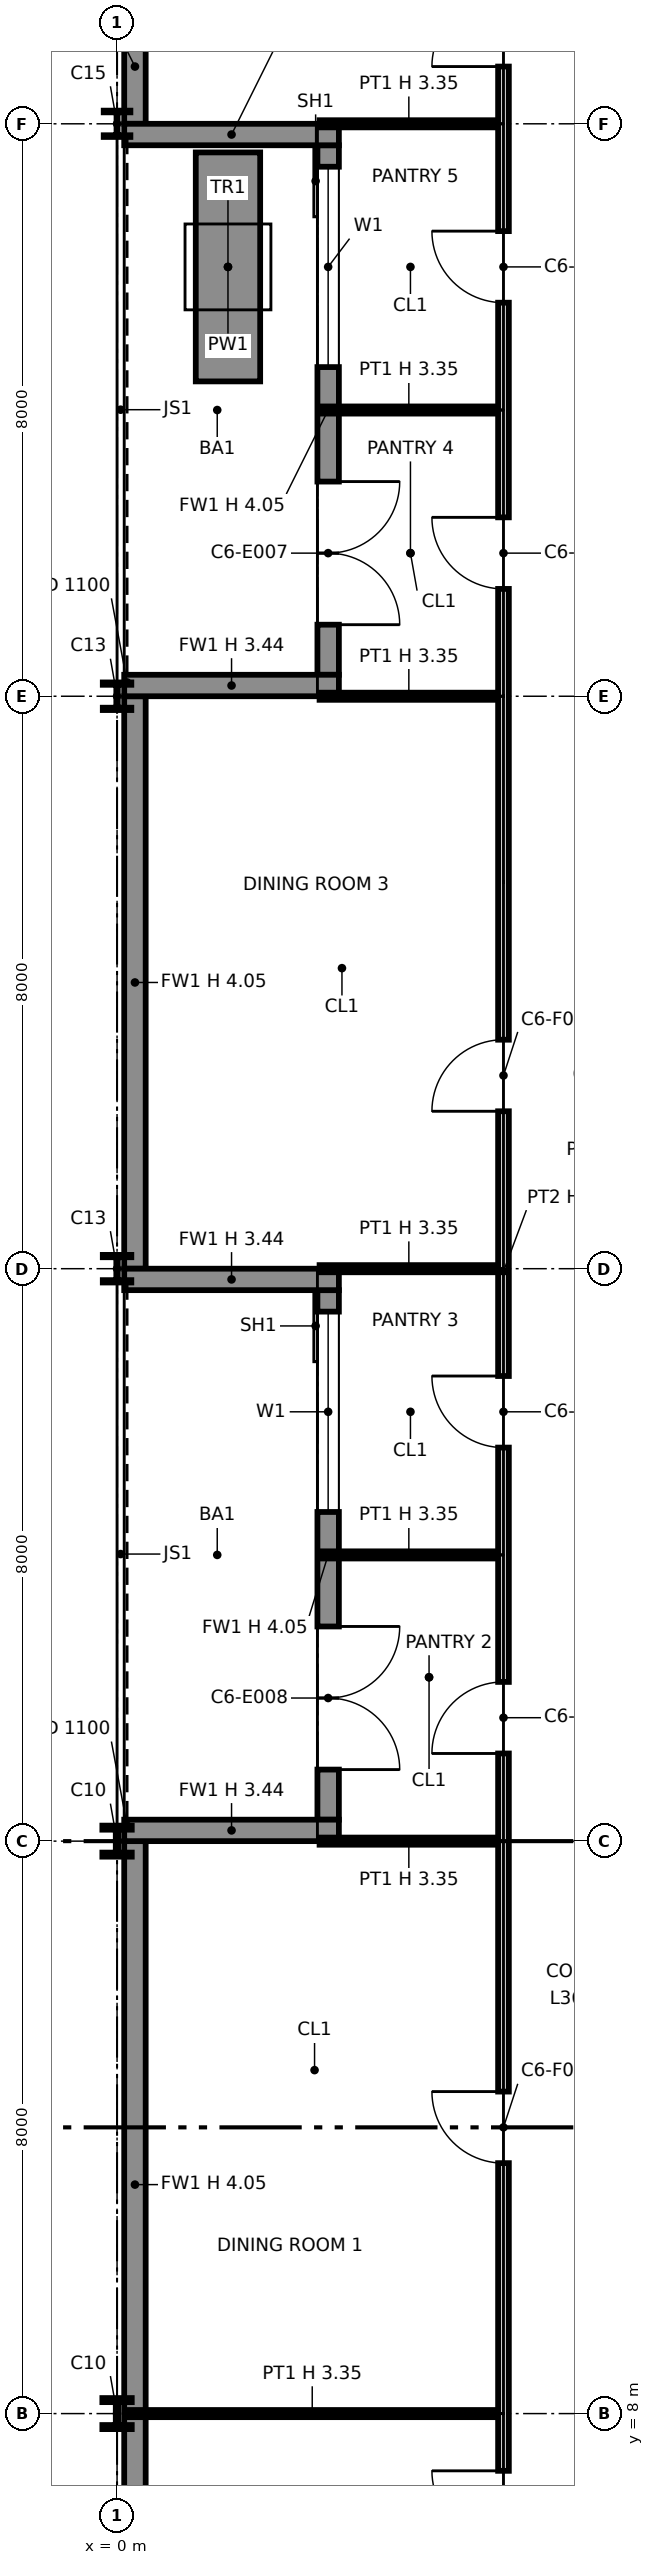
"""IFC4 building model, lengths in metres.
Left out: names, types, materials, properties, quantities, classifications, styles, units other than length and angle.
Written with IfcOpenShell. Run it as: python <this file> out.ifc"""

import sys

from ifc_helpers import new_model, si_unit, direction, frame, frame_2d, origin, origin_2d, place, context, subcontext, project, spatial, polyline, rectangle, i_section, outline, extrude, element, fill, save


model = new_model("IFC4")
c1 = context("Model", 3, precision=1e-05, world=origin(), true_north=direction((0.0, 1.0)))
c2 = subcontext(c1, "Body", "Model", "MODEL_VIEW")
j1 = project(units=[si_unit("LENGTHUNIT", "METRE"), si_unit("PLANEANGLEUNIT", "RADIAN")], contexts=[c1])
p1 = place(None, origin())
s1 = spatial("IfcSite", under=j1, at=p1, CompositionType="ELEMENT")
p2 = place(p1, origin())
s2 = spatial("IfcBuilding", under=s1, at=p2, CompositionType="ELEMENT")
p3 = place(p2, frame((0.0, 0.0, 174.6)))
s3 = spatial("IfcBuildingStorey", under=s2, at=p3, CompositionType="ELEMENT", Elevation=174.6)
for number, where, z_axis, x_axis in (
    (1, (0.0, 8.0, 0.0), (0.0, 0.0, 1.0), (1.0, 0.0, 0.0)),
    (2, (0.0, 16.0, 0.0), (0.0, 0.0, 1.0), (1.0, 0.0, 0.0)),
):
    element("IfcColumn", number, at=place(p3, frame(where, z_axis=z_axis, x_axis=x_axis)), inside=s3, PredefinedType="COLUMN", context=c2, shape_type="SweptSolid", body=[
        extrude(i_section(OverallWidth=0.411, OverallDepth=0.434, WebThickness=0.036, FlangeThickness=0.057, at=origin_2d()), origin(), (0.0, 0.0, 1.0), 4.05),
    ])
for number, where, z_axis, x_axis in (
    (3, (0.0, 24.0, 0.0), (0.0, 0.0, 1.0), (1.0, 0.0, 0.0)),
    (4, (0.0, 32.0, 0.0), (0.0, 0.0, 1.0), (1.0, 0.0, 0.0)),
):
    element("IfcColumn", number, at=place(p3, frame(where, z_axis=z_axis, x_axis=x_axis)), inside=s3, PredefinedType="COLUMN", context=c2, shape_type="SweptSolid", body=[
        extrude(i_section(OverallWidth=0.399, OverallDepth=0.386, WebThickness=0.021, FlangeThickness=0.033, at=origin_2d()), origin(), (0.0, 0.0, 1.0), 4.05),
    ])
p4 = place(p3, frame((0.0, 40.0, 0.0), z_axis=(0.0, 0.0, 1.0), x_axis=(1.0, 0.0, 0.0)))
e5 = element("IfcColumn", 5, at=p4, inside=s3, PredefinedType="COLUMN", context=c2, shape_type="SweptSolid", body=[
    extrude(i_section(OverallWidth=0.373, OverallDepth=0.368, WebThickness=0.015, FlangeThickness=0.024, at=origin_2d()), origin(), (0.0, 0.0, 1.0), 4.05),
])
p5 = place(p3, frame((0.25, 41.6, 0.0), z_axis=(0.0, 0.0, 1.0), x_axis=(0.0, -1.0, 0.0)))
e6 = element("IfcWall", 6, at=p5, inside=s3, PredefinedType="SOLIDWALL", context=c2, shape_type="SweptSolid", body=[
    extrude(rectangle(XDim=1.6, YDim=0.3, at=frame_2d((0.8, 0.0))), origin(), (0.0, 0.0, 1.0), 4.05),
])
p6 = place(p3, frame((2.95, 39.7, 0.0), z_axis=(0.0, 0.0, 1.0), x_axis=(0.0, -1.0, 0.0)))
e7 = element("IfcWall", 7, at=p6, inside=s3, PredefinedType="SOLIDWALL", context=c2, shape_type="SweptSolid", body=[
    extrude(rectangle(XDim=7.4, YDim=0.3, at=frame_2d((3.7, 0.0))), origin(), (0.0, 0.0, 1.0), 4.05),
])
p7 = place(p6, frame((0.3, 0.0, 0.9)))
e8 = element("IfcOpeningElement", 8, at=p7, cuts=e7, PredefinedType="OPENING", context=c2, shape_type="SweptSolid", body=[
    extrude(rectangle(XDim=2.8, YDim=2.2, at=frame_2d((1.4, 1.1))), frame((0.0, 0.16, 0.0), z_axis=(0.0, -1.0, 0.0), x_axis=(1.0, 0.0, 0.0)), (0.0, 0.0, 1.0), 0.32),
])
p8 = place(p6, frame((4.7, 0.0, 0.0)))
e9 = element("IfcOpeningElement", 9, at=p8, cuts=e7, PredefinedType="OPENING", context=c2, shape_type="SweptSolid", body=[
    extrude(rectangle(XDim=2.0, YDim=2.4, at=frame_2d((1.0, 1.2))), frame((0.0, 0.16, 0.0), z_axis=(0.0, -1.0, 0.0), x_axis=(1.0, 0.0, 0.0)), (0.0, 0.0, 1.0), 0.32),
])
p9 = place(p3, frame((0.1, 39.85, 0.0), z_axis=(0.0, 0.0, 1.0), x_axis=(1.0, 0.0, 0.0)))
e10 = element("IfcWall", 10, at=p9, inside=s3, PredefinedType="SOLIDWALL", context=c2, shape_type="SweptSolid", body=[
    extrude(rectangle(XDim=3.0, YDim=0.3, at=frame_2d((1.5, 0.0))), origin(), (0.0, 0.0, 1.0), 3.353),
])
p10 = place(p3, frame((0.1, 32.15, 0.0), z_axis=(0.0, 0.0, 1.0), x_axis=(1.0, 0.0, 0.0)))
e11 = element("IfcWall", 11, at=p10, inside=s3, PredefinedType="SOLIDWALL", context=c2, shape_type="SweptSolid", body=[
    extrude(rectangle(XDim=3.0, YDim=0.3, at=frame_2d((1.5, 0.0))), origin(), (0.0, 0.0, 1.0), 3.437),
])
p11 = place(p3, frame((0.25, 32.0, 0.0), z_axis=(0.0, 0.0, 1.0), x_axis=(0.0, -1.0, 0.0)))
e12 = element("IfcWall", 12, at=p11, inside=s3, PredefinedType="SOLIDWALL", context=c2, shape_type="SweptSolid", body=[
    extrude(rectangle(XDim=8.0, YDim=0.3, at=frame_2d((4.0, 0.0))), origin(), (0.0, 0.0, 1.0), 4.05),
])
p12 = place(p3, frame((2.95, 23.7, 0.0), z_axis=(0.0, 0.0, 1.0), x_axis=(0.0, -1.0, 0.0)))
e13 = element("IfcWall", 13, at=p12, inside=s3, PredefinedType="SOLIDWALL", context=c2, shape_type="SweptSolid", body=[
    extrude(rectangle(XDim=7.4, YDim=0.3, at=frame_2d((3.7, 0.0))), origin(), (0.0, 0.0, 1.0), 4.05),
])
p13 = place(p12, frame((0.3, 0.0, 0.9)))
e14 = element("IfcOpeningElement", 14, at=p13, cuts=e13, PredefinedType="OPENING", context=c2, shape_type="SweptSolid", body=[
    extrude(rectangle(XDim=2.8, YDim=2.2, at=frame_2d((1.4, 1.1))), frame((0.0, 0.16, 0.0), z_axis=(0.0, -1.0, 0.0), x_axis=(1.0, 0.0, 0.0)), (0.0, 0.0, 1.0), 0.32),
])
p14 = place(p12, frame((4.7, 0.0, 0.0)))
e15 = element("IfcOpeningElement", 15, at=p14, cuts=e13, PredefinedType="OPENING", context=c2, shape_type="SweptSolid", body=[
    extrude(rectangle(XDim=2.0, YDim=2.4, at=frame_2d((1.0, 1.2))), frame((0.0, 0.16, 0.0), z_axis=(0.0, -1.0, 0.0), x_axis=(1.0, 0.0, 0.0)), (0.0, 0.0, 1.0), 0.32),
])
for number, where, z_axis, x_axis in (
    (16, (0.1, 23.85, 0.0), (0.0, 0.0, 1.0), (1.0, 0.0, 0.0)),
    (17, (0.1, 16.15, 0.0), (0.0, 0.0, 1.0), (1.0, 0.0, 0.0)),
):
    element("IfcWall", number, at=place(p3, frame(where, z_axis=z_axis, x_axis=x_axis)), inside=s3, PredefinedType="SOLIDWALL", context=c2, shape_type="SweptSolid", body=[
        extrude(rectangle(XDim=3.0, YDim=0.3, at=frame_2d((1.5, 0.0))), origin(), (0.0, 0.0, 1.0), 3.437),
    ])
p15 = place(p3, frame((0.25, 16.0, 0.0), z_axis=(0.0, 0.0, 1.0), x_axis=(0.0, -1.0, 0.0)))
e18 = element("IfcWall", 18, at=p15, inside=s3, PredefinedType="SOLIDWALL", context=c2, shape_type="SweptSolid", body=[
    extrude(rectangle(XDim=9.6, YDim=0.3, at=frame_2d((4.8, 0.0))), origin(), (0.0, 0.0, 1.0), 4.05),
])
p16 = place(p3, frame((1.55, 39.6, 0.0), z_axis=(0.0, 0.0, 1.0), x_axis=(0.0, -1.0, 0.0)))
e19 = element("IfcWall", 19, at=p16, inside=s3, PredefinedType="SOLIDWALL", context=c2, shape_type="SweptSolid", body=[
    extrude(rectangle(XDim=3.2, YDim=0.9, at=frame_2d((1.6, 0.0))), origin(), (0.0, 0.0, 1.0), 0.6),
])
p17 = place(p3, frame((5.4, 5.4, 0.0), z_axis=(0.0, 0.0, 1.0), x_axis=(0.0, 1.0, 0.0)))
e20 = element("IfcWall", 20, at=p17, inside=s3, PredefinedType="PARTITIONING", context=c2, shape_type="SweptSolid", body=[
    extrude(outline(polyline([(0.0, 0.0), (37.125, 0.0), (37.125, 4.05), (34.9, 4.05), (34.898, 3.354), (34.302, 3.354), (34.3, 4.05), (30.9, 4.05), (30.898, 3.354), (30.302, 3.354), (30.3, 4.05), (26.9, 4.05), (26.898, 3.354), (26.302, 3.354), (26.3, 4.05), (22.9, 4.05), (22.898, 3.354), (22.302, 3.354), (22.3, 4.05), (18.9, 4.05), (18.898, 3.354), (18.302, 3.354), (18.3, 4.05), (14.9, 4.05), (14.898, 3.354), (14.302, 3.354), (14.3, 4.05), (10.9, 4.05), (10.898, 3.354), (10.302, 3.354), (10.3, 4.05), (6.9, 4.05), (6.898, 3.354), (6.302, 3.354), (6.3, 4.05), (2.9, 4.05), (2.898, 3.354), (2.302, 3.354), (2.3, 4.05), (0.0, 4.05), (0.0, 0.0)])), frame((0.0, 0.075, 0.0), z_axis=(0.0, -1.0, 0.0), x_axis=(1.0, 0.0, 0.0)), (0.0, 0.0, 1.0), 0.15),
])
p18 = place(p17, frame((0.8, 0.0, 0.0)))
e21 = element("IfcOpeningElement", 21, at=p18, cuts=e20, PredefinedType="OPENING", context=c2, shape_type="SweptSolid", body=[
    extrude(rectangle(XDim=1.0, YDim=2.1, at=frame_2d((0.5, 1.05))), frame((0.0, 0.085, 0.0), z_axis=(0.0, -1.0, 0.0), x_axis=(1.0, 0.0, 0.0)), (0.0, 0.0, 1.0), 0.17),
])
p19 = place(p17, frame((6.1, 0.0, 0.0)))
e22 = element("IfcOpeningElement", 22, at=p19, cuts=e20, PredefinedType="OPENING", context=c2, shape_type="SweptSolid", body=[
    extrude(rectangle(XDim=1.0, YDim=2.1, at=frame_2d((0.5, 1.05))), frame((0.0, 0.085, 0.0), z_axis=(0.0, -1.0, 0.0), x_axis=(1.0, 0.0, 0.0)), (0.0, 0.0, 1.0), 0.17),
])
p20 = place(p17, frame((11.825, 0.0, 0.0)))
e23 = element("IfcOpeningElement", 23, at=p20, cuts=e20, PredefinedType="OPENING", context=c2, shape_type="SweptSolid", body=[
    extrude(rectangle(XDim=1.0, YDim=2.1, at=frame_2d((0.5, 1.05))), frame((0.0, 0.085, 0.0), z_axis=(0.0, -1.0, 0.0), x_axis=(1.0, 0.0, 0.0)), (0.0, 0.0, 1.0), 0.17),
])
p21 = place(p17, frame((16.1, 0.0, 0.0)))
e24 = element("IfcOpeningElement", 24, at=p21, cuts=e20, PredefinedType="OPENING", context=c2, shape_type="SweptSolid", body=[
    extrude(rectangle(XDim=1.0, YDim=2.1, at=frame_2d((0.5, 1.05))), frame((0.0, 0.085, 0.0), z_axis=(0.0, -1.0, 0.0), x_axis=(1.0, 0.0, 0.0)), (0.0, 0.0, 1.0), 0.17),
])
p22 = place(p17, frame((20.8, 0.0, 0.0)))
e25 = element("IfcOpeningElement", 25, at=p22, cuts=e20, PredefinedType="OPENING", context=c2, shape_type="SweptSolid", body=[
    extrude(rectangle(XDim=1.0, YDim=2.1, at=frame_2d((0.5, 1.05))), frame((0.0, 0.085, 0.0), z_axis=(0.0, -1.0, 0.0), x_axis=(1.0, 0.0, 0.0)), (0.0, 0.0, 1.0), 0.17),
])
p23 = place(p17, frame((28.1, 0.0, 0.0)))
e26 = element("IfcOpeningElement", 26, at=p23, cuts=e20, PredefinedType="OPENING", context=c2, shape_type="SweptSolid", body=[
    extrude(rectangle(XDim=1.0, YDim=2.1, at=frame_2d((0.5, 1.05))), frame((0.0, 0.085, 0.0), z_axis=(0.0, -1.0, 0.0), x_axis=(1.0, 0.0, 0.0)), (0.0, 0.0, 1.0), 0.17),
])
p24 = place(p17, frame((32.1, 0.0, 0.0)))
e27 = element("IfcOpeningElement", 27, at=p24, cuts=e20, PredefinedType="OPENING", context=c2, shape_type="SweptSolid", body=[
    extrude(rectangle(XDim=1.0, YDim=2.1, at=frame_2d((0.5, 1.05))), frame((0.0, 0.085, 0.0), z_axis=(0.0, -1.0, 0.0), x_axis=(1.0, 0.0, 0.0)), (0.0, 0.0, 1.0), 0.17),
])
p25 = place(p17, frame((35.4, 0.0, 0.0)))
e28 = element("IfcOpeningElement", 28, at=p25, cuts=e20, PredefinedType="OPENING", context=c2, shape_type="SweptSolid", body=[
    extrude(rectangle(XDim=1.0, YDim=2.1, at=frame_2d((0.5, 1.05))), frame((0.0, 0.085, 0.0), z_axis=(0.0, -1.0, 0.0), x_axis=(1.0, 0.0, 0.0)), (0.0, 0.0, 1.0), 0.17),
])
p26 = place(p3, frame((0.13, 8.0, 0.0), z_axis=(0.0, 0.0, 1.0), x_axis=(1.0, 0.0, 0.0)))
e29 = element("IfcWall", 29, at=p26, inside=s3, PredefinedType="PARTITIONING", context=c2, shape_type="SweptSolid", body=[
    extrude(rectangle(XDim=5.195, YDim=0.1, at=frame_2d((2.598, 0.0))), origin(), (0.0, 0.0, 1.0), 3.354),
])
for number, where, z_axis, x_axis in (
    (30, (2.83, 16.0, 0.0), (0.0, 0.0, 1.0), (1.0, 0.0, 0.0)),
    (31, (2.83, 20.0, 0.0), (0.0, 0.0, 1.0), (1.0, 0.0, 0.0)),
    (32, (2.83, 24.0, 0.0), (0.0, 0.0, 1.0), (1.0, 0.0, 0.0)),
    (33, (2.83, 32.0, 0.0), (0.0, 0.0, 1.0), (1.0, 0.0, 0.0)),
    (34, (2.83, 36.0, 0.0), (0.0, 0.0, 1.0), (1.0, 0.0, 0.0)),
    (35, (2.83, 40.0, 0.0), (0.0, 0.0, 1.0), (1.0, 0.0, 0.0)),
):
    element("IfcWall", number, at=place(p3, frame(where, z_axis=z_axis, x_axis=x_axis)), inside=s3, PredefinedType="PARTITIONING", context=c2, shape_type="SweptSolid", body=[
        extrude(rectangle(XDim=2.495, YDim=0.1, at=frame_2d((1.248, 0.0))), origin(), (0.0, 0.0, 1.0), 3.354),
    ])
p27 = place(p7, origin())
e36 = element("IfcWindow", 36, at=p27, inside=s3, PartitioningType="SINGLE_PANEL", PredefinedType="WINDOW", context=c2, shape_type="SweptSolid", body=[
    extrude(rectangle(XDim=2.8, YDim=2.2, at=frame_2d((1.4, 1.1))), frame((0.0, 0.03, 0.0), z_axis=(0.0, -1.0, 0.0), x_axis=(1.0, 0.0, 0.0)), (0.0, 0.0, 1.0), 0.06),
])
fill(e8, e36)
p28 = place(p8, origin())
e37 = element("IfcDoor", 37, at=p28, inside=s3, OperationType="DOUBLE_DOOR_SINGLE_SWING", PredefinedType="DOOR", context=c2, shape_type="SweptSolid", body=[
    extrude(rectangle(XDim=2.0, YDim=2.4, at=frame_2d((1.0, 1.2))), frame((0.0, 0.025, 0.0), z_axis=(0.0, -1.0, 0.0), x_axis=(1.0, 0.0, 0.0)), (0.0, 0.0, 1.0), 0.05),
])
fill(e9, e37)
p29 = place(p13, origin())
e38 = element("IfcWindow", 38, at=p29, inside=s3, PartitioningType="SINGLE_PANEL", PredefinedType="WINDOW", context=c2, shape_type="SweptSolid", body=[
    extrude(rectangle(XDim=2.8, YDim=2.2, at=frame_2d((1.4, 1.1))), frame((0.0, 0.03, 0.0), z_axis=(0.0, -1.0, 0.0), x_axis=(1.0, 0.0, 0.0)), (0.0, 0.0, 1.0), 0.06),
])
fill(e14, e38)
p30 = place(p14, origin())
e39 = element("IfcDoor", 39, at=p30, inside=s3, OperationType="DOUBLE_DOOR_SINGLE_SWING", PredefinedType="DOOR", context=c2, shape_type="SweptSolid", body=[
    extrude(rectangle(XDim=2.0, YDim=2.4, at=frame_2d((1.0, 1.2))), frame((0.0, 0.025, 0.0), z_axis=(0.0, -1.0, 0.0), x_axis=(1.0, 0.0, 0.0)), (0.0, 0.0, 1.0), 0.05),
])
fill(e15, e39)
p31 = place(p18, origin())
e40 = element("IfcDoor", 40, at=p31, inside=s3, OperationType="SINGLE_SWING_RIGHT", PredefinedType="DOOR", context=c2, shape_type="SweptSolid", body=[
    extrude(rectangle(XDim=1.0, YDim=2.1, at=frame_2d((0.5, 1.05))), frame((0.0, 0.025, 0.0), z_axis=(0.0, -1.0, 0.0), x_axis=(1.0, 0.0, 0.0)), (0.0, 0.0, 1.0), 0.05),
])
fill(e21, e40)
p32 = place(p19, origin())
e41 = element("IfcDoor", 41, at=p32, inside=s3, OperationType="SINGLE_SWING_RIGHT", PredefinedType="DOOR", context=c2, shape_type="SweptSolid", body=[
    extrude(rectangle(XDim=1.0, YDim=2.1, at=frame_2d((0.5, 1.05))), frame((0.0, 0.025, 0.0), z_axis=(0.0, -1.0, 0.0), x_axis=(1.0, 0.0, 0.0)), (0.0, 0.0, 1.0), 0.05),
])
fill(e22, e41)
p33 = place(p20, origin())
e42 = element("IfcDoor", 42, at=p33, inside=s3, OperationType="SINGLE_SWING_LEFT", PredefinedType="DOOR", context=c2, shape_type="SweptSolid", body=[
    extrude(rectangle(XDim=1.0, YDim=2.1, at=frame_2d((0.5, 1.05))), frame((0.0, 0.025, 0.0), z_axis=(0.0, -1.0, 0.0), x_axis=(1.0, 0.0, 0.0)), (0.0, 0.0, 1.0), 0.05),
])
fill(e23, e42)
p34 = place(p21, origin())
e43 = element("IfcDoor", 43, at=p34, inside=s3, OperationType="SINGLE_SWING_RIGHT", PredefinedType="DOOR", context=c2, shape_type="SweptSolid", body=[
    extrude(rectangle(XDim=1.0, YDim=2.1, at=frame_2d((0.5, 1.05))), frame((0.0, 0.025, 0.0), z_axis=(0.0, -1.0, 0.0), x_axis=(1.0, 0.0, 0.0)), (0.0, 0.0, 1.0), 0.05),
])
fill(e24, e43)
p35 = place(p22, origin())
e44 = element("IfcDoor", 44, at=p35, inside=s3, OperationType="SINGLE_SWING_LEFT", PredefinedType="DOOR", context=c2, shape_type="SweptSolid", body=[
    extrude(rectangle(XDim=1.0, YDim=2.1, at=frame_2d((0.5, 1.05))), frame((0.0, 0.025, 0.0), z_axis=(0.0, -1.0, 0.0), x_axis=(1.0, 0.0, 0.0)), (0.0, 0.0, 1.0), 0.05),
])
fill(e25, e44)
p36 = place(p23, origin())
e45 = element("IfcDoor", 45, at=p36, inside=s3, OperationType="SINGLE_SWING_RIGHT", PredefinedType="DOOR", context=c2, shape_type="SweptSolid", body=[
    extrude(rectangle(XDim=1.0, YDim=2.1, at=frame_2d((0.5, 1.05))), frame((0.0, 0.025, 0.0), z_axis=(0.0, -1.0, 0.0), x_axis=(1.0, 0.0, 0.0)), (0.0, 0.0, 1.0), 0.05),
])
fill(e26, e45)
p37 = place(p24, origin())
e46 = element("IfcDoor", 46, at=p37, inside=s3, OperationType="SINGLE_SWING_RIGHT", PredefinedType="DOOR", context=c2, shape_type="SweptSolid", body=[
    extrude(rectangle(XDim=1.0, YDim=2.1, at=frame_2d((0.5, 1.05))), frame((0.0, 0.025, 0.0), z_axis=(0.0, -1.0, 0.0), x_axis=(1.0, 0.0, 0.0)), (0.0, 0.0, 1.0), 0.05),
])
fill(e27, e46)
p38 = place(p25, origin())
e47 = element("IfcDoor", 47, at=p38, inside=s3, OperationType="SINGLE_SWING_LEFT", PredefinedType="DOOR", context=c2, shape_type="SweptSolid", body=[
    extrude(rectangle(XDim=1.0, YDim=2.1, at=frame_2d((0.5, 1.05))), frame((0.0, 0.025, 0.0), z_axis=(0.0, -1.0, 0.0), x_axis=(1.0, 0.0, 0.0)), (0.0, 0.0, 1.0), 0.05),
])
fill(e28, e47)
save(model, sys.argv[1])
